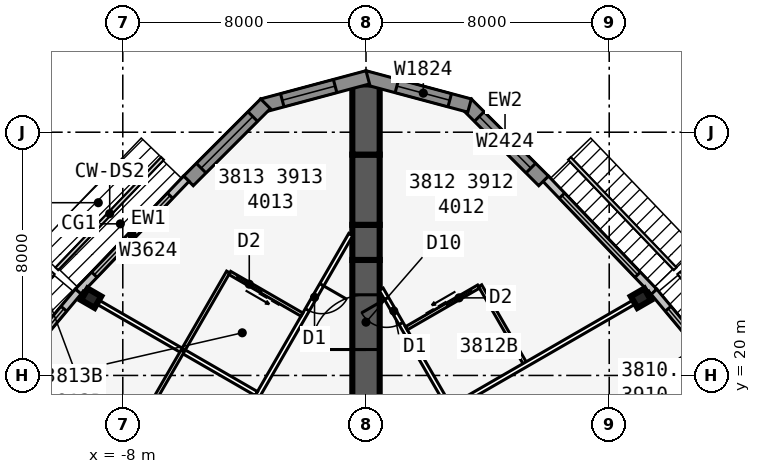
"""IFC4 building model, lengths in metres.
Left out: names, types, materials, properties, quantities, classifications, styles, units other than length and angle.
Written with IfcOpenShell. Run it as: python <this file> out.ifc"""

import sys

from ifc_helpers import new_model, si_unit, direction, frame, frame_2d, origin, origin_2d, place, context, subcontext, project, spatial, polyline, rectangle, i_section, outline, extrude, element, fill, save


model = new_model("IFC4")
c1 = context("Model", 3, precision=1e-05, world=origin(), true_north=direction((0.0, 1.0)))
c2 = subcontext(c1, "Body", "Model", "MODEL_VIEW")
j1 = project(units=[si_unit("LENGTHUNIT", "METRE"), si_unit("PLANEANGLEUNIT", "RADIAN")], contexts=[c1])
p1 = place(None, origin())
s1 = spatial("IfcSite", under=j1, at=p1, CompositionType="ELEMENT")
p2 = place(p1, origin())
s2 = spatial("IfcBuilding", under=s1, at=p2, CompositionType="ELEMENT")
p3 = place(p2, frame((0.0, 0.0, 145.3)))
s3 = spatial("IfcBuildingStorey", under=s2, at=p3, CompositionType="ELEMENT", Elevation=145.3)
p4 = place(p3, frame((0.0, 19.052, 0.0), z_axis=(0.0, 0.0, 1.0), x_axis=(0.0, 1.0, 0.0)))
e1 = element("IfcWall", 1, at=p4, inside=s3, PredefinedType="SHEAR", context=c2, shape_type="SweptSolid", body=[
    extrude(rectangle(XDim=4.746, YDim=0.9, at=frame_2d((2.373, 0.0))), origin(), (0.0, 0.0, 1.0), 3.4),
])
p5 = place(p4, frame((1.8, 0.0, 0.0)))
e2 = element("IfcOpeningElement", 2, at=p5, cuts=e1, PredefinedType="OPENING", context=c2, shape_type="SweptSolid", body=[
    extrude(rectangle(XDim=1.8, YDim=2.13, at=frame_2d((0.9, 1.065))), frame((0.0, 0.46, 0.0), z_axis=(0.0, -1.0, 0.0), x_axis=(1.0, 0.0, 0.0)), (0.0, 0.0, 1.0), 0.92),
])
p6 = place(p3, frame((0.0, 23.799, 0.0), z_axis=(0.0, 0.0, 1.0), x_axis=(0.0, 1.0, 0.0)))
e3 = element("IfcWall", 3, at=p6, inside=s3, PredefinedType="SHEAR", context=c2, shape_type="SweptSolid", body=[
    extrude(rectangle(XDim=1.155, YDim=0.9, at=frame_2d((0.577, 0.0))), origin(), (0.0, 0.0, 1.0), 3.4),
])
p7 = place(p3, frame((0.0, 24.953, 0.0), z_axis=(0.0, 0.0, 1.0), x_axis=(0.0, 1.0, 0.0)))
e4 = element("IfcWall", 4, at=p7, inside=s3, PredefinedType="SHEAR", context=c2, shape_type="SweptSolid", body=[
    extrude(rectangle(XDim=2.309, YDim=0.9, at=frame_2d((1.155, 0.0))), origin(), (0.0, 0.0, 1.0), 3.4),
])
p8 = place(p3, frame((0.0, 27.263, 0.0), z_axis=(0.0, 0.0, 1.0), x_axis=(0.0, 1.0, 0.0)))
e5 = element("IfcWall", 5, at=p8, inside=s3, PredefinedType="SHEAR", context=c2, shape_type="SweptSolid", body=[
    extrude(rectangle(XDim=2.31, YDim=0.9, at=frame_2d((1.155, 0.0))), origin(), (0.0, 0.0, 1.0), 3.4),
])
for number, where, z_axis, x_axis in (
    (6, (9.041, 22.541, 0.0), (0.0, 0.0, 1.0), (-0.5, 0.866, 0.0)),
    (7, (-9.041, 22.541, 0.0), (0.0, 0.0, 1.0), (-0.5, -0.866, 0.0)),
):
    element("IfcColumn", number, at=place(p3, frame(where, z_axis=z_axis, x_axis=x_axis)), inside=s3, PredefinedType="COLUMN", context=c2, shape_type="SweptSolid", body=[
        extrude(i_section(OverallWidth=0.437, OverallDepth=0.513, WebThickness=0.061, FlangeThickness=0.097, at=origin_2d()), origin(), (0.0, 0.0, 1.0), 3.4),
    ])
p9 = place(p3, frame((12.723, 18.868, 0.0), z_axis=(0.0, 0.0, 1.0), x_axis=(-0.641810386606, 0.766863369607, 0.0)))
e8 = element("IfcWall", 8, at=p9, inside=s3, PredefinedType="STANDARD", context=c2, shape_type="SweptSolid", body=[
    extrude(rectangle(XDim=5.076, YDim=0.25, at=frame_2d((2.538, 0.0))), origin(), (0.0, 0.0, 1.0), 3.235),
])
p10 = place(p9, frame((0.738, 0.0, 0.45)))
e9 = element("IfcOpeningElement", 9, at=p10, cuts=e8, PredefinedType="OPENING", context=c2, shape_type="SweptSolid", body=[
    extrude(rectangle(XDim=3.6, YDim=2.4, at=frame_2d((1.8, 1.2))), frame((0.0, 0.135, 0.0), z_axis=(0.0, -1.0, 0.0), x_axis=(1.0, 0.0, 0.0)), (0.0, 0.0, 1.0), 0.27),
])
p11 = place(p3, frame((9.471, 22.754, 0.0), z_axis=(0.0, 0.0, 1.0), x_axis=(-0.691719937936, 0.722165858693, 0.0)))
e10 = element("IfcWall", 10, at=p11, inside=s3, PredefinedType="STANDARD", context=c2, shape_type="SweptSolid", body=[
    extrude(rectangle(XDim=5.148, YDim=0.25, at=frame_2d((2.574, 0.0))), origin(), (0.0, 0.0, 1.0), 3.235),
])
p12 = place(p11, frame((0.774, 0.0, 0.45)))
e11 = element("IfcOpeningElement", 11, at=p12, cuts=e10, PredefinedType="OPENING", context=c2, shape_type="SweptSolid", body=[
    extrude(rectangle(XDim=3.6, YDim=2.4, at=frame_2d((1.8, 1.2))), frame((0.0, 0.135, 0.0), z_axis=(0.0, -1.0, 0.0), x_axis=(1.0, 0.0, 0.0)), (0.0, 0.0, 1.0), 0.27),
])
p13 = place(p3, frame((5.841, 26.399, 0.0), z_axis=(0.0, 0.0, 1.0), x_axis=(-0.707106781187, 0.707106781187, 0.0)))
e12 = element("IfcWall", 12, at=p13, inside=s3, PredefinedType="SOLIDWALL", context=c2, shape_type="SweptSolid", body=[
    extrude(rectangle(XDim=3.586, YDim=0.45, at=frame_2d((1.793, 0.0))), origin(), (0.0, 0.0, 1.0), 3.235),
])
p14 = place(p13, frame((0.593, 0.0, 0.45)))
e13 = element("IfcOpeningElement", 13, at=p14, cuts=e12, PredefinedType="OPENING", context=c2, shape_type="SweptSolid", body=[
    extrude(rectangle(XDim=2.4, YDim=2.4, at=frame_2d((1.2, 1.2))), frame((0.0, 0.235, 0.0), z_axis=(0.0, -1.0, 0.0), x_axis=(1.0, 0.0, 0.0)), (0.0, 0.0, 1.0), 0.47),
])
p15 = place(p3, frame((3.406, 28.877, 0.0), z_axis=(0.0, 0.0, 1.0), x_axis=(-0.965924653531, 0.258823421857, 0.0)))
e14 = element("IfcWall", 14, at=p15, inside=s3, PredefinedType="SOLIDWALL", context=c2, shape_type="SweptSolid", body=[
    extrude(outline(polyline([(3.586, 0.225), (3.527, 0.225), (3.035, 0.093), (3.0, 0.225), (0.0, 0.225), (0.0, -0.225), (3.586, -0.225), (3.586, 0.225)])), origin(), (0.0, 0.0, 1.0), 3.235),
])
p16 = place(p15, frame((0.675, 0.0, 0.45)))
e15 = element("IfcOpeningElement", 15, at=p16, cuts=e14, PredefinedType="OPENING", context=c2, shape_type="SweptSolid", body=[
    extrude(rectangle(XDim=1.8, YDim=2.4, at=frame_2d((0.9, 1.2))), frame((0.0, 0.235, 0.0), z_axis=(0.0, -1.0, 0.0), x_axis=(1.0, 0.0, 0.0)), (0.0, 0.0, 1.0), 0.47),
])
p17 = place(p3, frame((0.058, 29.805, 0.0), z_axis=(0.0, 0.0, 1.0), x_axis=(-0.965924653531, -0.258823421857, 0.0)))
e16 = element("IfcWall", 16, at=p17, inside=s3, PredefinedType="SOLIDWALL", context=c2, shape_type="SweptSolid", body=[
    extrude(outline(polyline([(3.586, 0.225), (0.586, 0.225), (0.551, 0.093), (0.06, 0.225), (0.0, 0.225), (0.0, -0.225), (3.586, -0.225), (3.586, 0.225)])), origin(), (0.0, 0.0, 1.0), 3.235),
])
p18 = place(p17, frame((1.111, 0.0, 0.45)))
e17 = element("IfcOpeningElement", 17, at=p18, cuts=e16, PredefinedType="OPENING", context=c2, shape_type="SweptSolid", body=[
    extrude(rectangle(XDim=1.8, YDim=2.4, at=frame_2d((0.9, 1.2))), frame((0.0, 0.235, 0.0), z_axis=(0.0, -1.0, 0.0), x_axis=(1.0, 0.0, 0.0)), (0.0, 0.0, 1.0), 0.47),
])
p19 = place(p3, frame((-3.305, 28.935, 0.0), z_axis=(0.0, 0.0, 1.0), x_axis=(-0.707106781187, -0.707106781187, 0.0)))
e18 = element("IfcWall", 18, at=p19, inside=s3, PredefinedType="SOLIDWALL", context=c2, shape_type="SweptSolid", body=[
    extrude(rectangle(XDim=3.586, YDim=0.45, at=frame_2d((1.793, 0.0))), origin(), (0.0, 0.0, 1.0), 3.235),
])
p20 = place(p19, frame((0.593, 0.0, 0.45)))
e19 = element("IfcOpeningElement", 19, at=p20, cuts=e18, PredefinedType="OPENING", context=c2, shape_type="SweptSolid", body=[
    extrude(rectangle(XDim=2.4, YDim=2.4, at=frame_2d((1.2, 1.2))), frame((0.0, 0.235, 0.0), z_axis=(0.0, -1.0, 0.0), x_axis=(1.0, 0.0, 0.0)), (0.0, 0.0, 1.0), 0.47),
])
p21 = place(p3, frame((-5.91, 26.472, 0.0), z_axis=(0.0, 0.0, 1.0), x_axis=(-0.691719937936, -0.722165858693, 0.0)))
e20 = element("IfcWall", 20, at=p21, inside=s3, PredefinedType="STANDARD", context=c2, shape_type="SweptSolid", body=[
    extrude(rectangle(XDim=5.148, YDim=0.25, at=frame_2d((2.574, 0.0))), origin(), (0.0, 0.0, 1.0), 3.235),
])
p22 = place(p21, frame((0.774, 0.0, 0.45)))
e21 = element("IfcOpeningElement", 21, at=p22, cuts=e20, PredefinedType="OPENING", context=c2, shape_type="SweptSolid", body=[
    extrude(rectangle(XDim=3.6, YDim=2.4, at=frame_2d((1.8, 1.2))), frame((0.0, 0.135, 0.0), z_axis=(0.0, -1.0, 0.0), x_axis=(1.0, 0.0, 0.0)), (0.0, 0.0, 1.0), 0.27),
])
p23 = place(p3, frame((-9.465, 22.76, 0.0), z_axis=(0.0, 0.0, 1.0), x_axis=(-0.641810386606, -0.766863369607, 0.0)))
e22 = element("IfcWall", 22, at=p23, inside=s3, PredefinedType="STANDARD", context=c2, shape_type="SweptSolid", body=[
    extrude(rectangle(XDim=5.076, YDim=0.25, at=frame_2d((2.538, 0.0))), origin(), (0.0, 0.0, 1.0), 3.235),
])
p24 = place(p23, frame((0.738, 0.0, 0.45)))
e23 = element("IfcOpeningElement", 23, at=p24, cuts=e22, PredefinedType="OPENING", context=c2, shape_type="SweptSolid", body=[
    extrude(rectangle(XDim=3.6, YDim=2.4, at=frame_2d((1.8, 1.2))), frame((0.0, 0.135, 0.0), z_axis=(0.0, -1.0, 0.0), x_axis=(1.0, 0.0, 0.0)), (0.0, 0.0, 1.0), 0.27),
])
p25 = place(p3, frame((20.027, -10.985, 0.0), z_axis=(0.0, 0.0, 1.0), x_axis=(-0.500001677587, 0.866024435227, 0.0)))
e24 = element("IfcWall", 24, at=p25, inside=s3, PredefinedType="PARTITIONING", context=c2, shape_type="SweptSolid", body=[
    extrude(rectangle(XDim=39.054, YDim=0.15, at=frame_2d((19.527, 0.0))), origin(), (0.0, 0.0, 1.0), 3.235),
])
p26 = place(p25, frame((0.352, 0.0, 0.0)))
e25 = element("IfcOpeningElement", 25, at=p26, cuts=e24, PredefinedType="OPENING", context=c2, shape_type="SweptSolid", body=[
    extrude(rectangle(XDim=0.95, YDim=2.13, at=frame_2d((0.475, 1.065))), frame((0.0, 0.085, 0.0), z_axis=(0.0, -1.0, 0.0), x_axis=(1.0, 0.0, 0.0)), (0.0, 0.0, 1.0), 0.17),
])
p27 = place(p25, frame((6.552, 0.0, 0.0)))
e26 = element("IfcOpeningElement", 26, at=p27, cuts=e24, PredefinedType="OPENING", context=c2, shape_type="SweptSolid", body=[
    extrude(rectangle(XDim=0.95, YDim=2.13, at=frame_2d((0.475, 1.065))), frame((0.0, 0.085, 0.0), z_axis=(0.0, -1.0, 0.0), x_axis=(1.0, 0.0, 0.0)), (0.0, 0.0, 1.0), 0.17),
])
p28 = place(p25, frame((17.152, 0.0, 0.0)))
e27 = element("IfcOpeningElement", 27, at=p28, cuts=e24, PredefinedType="OPENING", context=c2, shape_type="SweptSolid", body=[
    extrude(rectangle(XDim=0.95, YDim=2.13, at=frame_2d((0.475, 1.065))), frame((0.0, 0.085, 0.0), z_axis=(0.0, -1.0, 0.0), x_axis=(1.0, 0.0, 0.0)), (0.0, 0.0, 1.0), 0.17),
])
p29 = place(p25, frame((21.552, 0.0, 0.0)))
e28 = element("IfcOpeningElement", 28, at=p29, cuts=e24, PredefinedType="OPENING", context=c2, shape_type="SweptSolid", body=[
    extrude(rectangle(XDim=0.95, YDim=2.13, at=frame_2d((0.475, 1.065))), frame((0.0, 0.085, 0.0), z_axis=(0.0, -1.0, 0.0), x_axis=(1.0, 0.0, 0.0)), (0.0, 0.0, 1.0), 0.17),
])
p30 = place(p25, frame((32.152, 0.0, 0.0)))
e29 = element("IfcOpeningElement", 29, at=p30, cuts=e24, PredefinedType="OPENING", context=c2, shape_type="SweptSolid", body=[
    extrude(rectangle(XDim=0.95, YDim=2.13, at=frame_2d((0.475, 1.065))), frame((0.0, 0.085, 0.0), z_axis=(0.0, -1.0, 0.0), x_axis=(1.0, 0.0, 0.0)), (0.0, 0.0, 1.0), 0.17),
])
p31 = place(p25, frame((37.752, 0.0, 0.0)))
e30 = element("IfcOpeningElement", 30, at=p31, cuts=e24, PredefinedType="OPENING", context=c2, shape_type="SweptSolid", body=[
    extrude(rectangle(XDim=0.95, YDim=2.13, at=frame_2d((0.475, 1.065))), frame((0.0, 0.085, 0.0), z_axis=(0.0, -1.0, 0.0), x_axis=(1.0, 0.0, 0.0)), (0.0, 0.0, 1.0), 0.17),
])
p32 = place(p3, frame((2.829, 18.954, 0.0), z_axis=(0.0, 0.0, 1.0), x_axis=(0.866015739374, 0.500016738876, 0.0)))
e31 = element("IfcWall", 31, at=p32, inside=s3, PredefinedType="PARTITIONING", context=c2, shape_type="SweptSolid", body=[
    extrude(rectangle(XDim=7.516, YDim=0.15, at=frame_2d((3.758, 0.0))), origin(), (0.0, 0.0, 1.0), 2.389),
])
p33 = place(p3, frame((5.253, 20.354, 0.0), z_axis=(0.0, 0.0, 1.0), x_axis=(-0.499990139034, 0.866031096941, 0.0)))
e32 = element("IfcWall", 32, at=p33, inside=s3, PredefinedType="PLUMBINGWALL", context=c2, shape_type="SweptSolid", body=[
    extrude(rectangle(XDim=3.0, YDim=0.12, at=frame_2d((1.5, 0.0))), origin(), (0.0, 0.0, 1.0), 3.235),
])
p34 = place(p3, frame((1.329, 21.552, 0.0), z_axis=(0.0, 0.0, 1.0), x_axis=(0.865997131366, 0.500048966069, 0.0)))
e33 = element("IfcWall", 33, at=p34, inside=s3, PredefinedType="PLUMBINGWALL", context=c2, shape_type="SweptSolid", body=[
    extrude(rectangle(XDim=2.74, YDim=0.12, at=frame_2d((1.37, 0.0))), origin(), (0.0, 0.0, 1.0), 3.235),
])
p35 = place(p34, frame((1.55, 0.0, 0.0)))
e34 = element("IfcOpeningElement", 34, at=p35, cuts=e33, PredefinedType="OPENING", context=c2, shape_type="SweptSolid", body=[
    extrude(rectangle(XDim=0.9, YDim=2.13, at=frame_2d((0.45, 1.065))), frame((0.0, 0.07, 0.0), z_axis=(0.0, -1.0, 0.0), x_axis=(1.0, 0.0, 0.0)), (0.0, 0.0, 1.0), 0.14),
])
p36 = place(p3, frame((-0.5, 24.636, 0.0), z_axis=(0.0, 0.0, 1.0), x_axis=(-0.500001915564, -0.86602429783, 0.0)))
e35 = element("IfcWall", 35, at=p36, inside=s3, PredefinedType="PARTITIONING", context=c2, shape_type="SweptSolid", body=[
    extrude(rectangle(XDim=42.172, YDim=0.15, at=frame_2d((21.086, 0.0))), origin(), (0.0, 0.0, 1.0), 3.235),
])
p37 = place(p36, frame((1.911, 0.0, 0.0)))
e36 = element("IfcOpeningElement", 36, at=p37, cuts=e35, PredefinedType="OPENING", context=c2, shape_type="SweptSolid", body=[
    extrude(rectangle(XDim=0.95, YDim=2.13, at=frame_2d((0.475, 1.065))), frame((0.0, 0.085, 0.0), z_axis=(0.0, -1.0, 0.0), x_axis=(1.0, 0.0, 0.0)), (0.0, 0.0, 1.0), 0.17),
])
p38 = place(p36, frame((9.311, 0.0, 0.0)))
e37 = element("IfcOpeningElement", 37, at=p38, cuts=e35, PredefinedType="OPENING", context=c2, shape_type="SweptSolid", body=[
    extrude(rectangle(XDim=0.95, YDim=2.13, at=frame_2d((0.475, 1.065))), frame((0.0, 0.085, 0.0), z_axis=(0.0, -1.0, 0.0), x_axis=(1.0, 0.0, 0.0)), (0.0, 0.0, 1.0), 0.17),
])
p39 = place(p36, frame((18.111, 0.0, 0.0)))
e38 = element("IfcOpeningElement", 38, at=p39, cuts=e35, PredefinedType="OPENING", context=c2, shape_type="SweptSolid", body=[
    extrude(rectangle(XDim=0.95, YDim=2.13, at=frame_2d((0.475, 1.065))), frame((0.0, 0.085, 0.0), z_axis=(0.0, -1.0, 0.0), x_axis=(1.0, 0.0, 0.0)), (0.0, 0.0, 1.0), 0.17),
])
p40 = place(p36, frame((29.311, 0.0, 0.0)))
e39 = element("IfcOpeningElement", 39, at=p40, cuts=e35, PredefinedType="OPENING", context=c2, shape_type="SweptSolid", body=[
    extrude(rectangle(XDim=0.95, YDim=2.13, at=frame_2d((0.475, 1.065))), frame((0.0, 0.085, 0.0), z_axis=(0.0, -1.0, 0.0), x_axis=(1.0, 0.0, 0.0)), (0.0, 0.0, 1.0), 0.17),
])
p41 = place(p36, frame((39.311, 0.0, 0.0)))
e40 = element("IfcOpeningElement", 40, at=p41, cuts=e35, PredefinedType="OPENING", context=c2, shape_type="SweptSolid", body=[
    extrude(rectangle(XDim=0.95, YDim=2.13, at=frame_2d((0.475, 1.065))), frame((0.0, 0.085, 0.0), z_axis=(0.0, -1.0, 0.0), x_axis=(1.0, 0.0, 0.0)), (0.0, 0.0, 1.0), 0.17),
])
p42 = place(p3, frame((-3.608, 19.404, 0.0), z_axis=(0.0, 0.0, 1.0), x_axis=(-0.866015989873, 0.500016305018, 0.0)))
e41 = element("IfcWall", 41, at=p42, inside=s3, PredefinedType="PARTITIONING", context=c2, shape_type="SweptSolid", body=[
    extrude(rectangle(XDim=6.616, YDim=0.15, at=frame_2d((3.308, 0.0))), origin(), (0.0, 0.0, 1.0), 2.389),
])
p43 = place(p3, frame((-4.533, 23.402, 0.0), z_axis=(0.0, 0.0, 1.0), x_axis=(-0.499990139034, -0.866031096941, 0.0)))
e42 = element("IfcWall", 42, at=p43, inside=s3, PredefinedType="PLUMBINGWALL", context=c2, shape_type="SweptSolid", body=[
    extrude(rectangle(XDim=3.0, YDim=0.12, at=frame_2d((1.5, 0.0))), origin(), (0.0, 0.0, 1.0), 3.235),
])
p44 = place(p3, frame((-2.108, 22.002, 0.0), z_axis=(0.0, 0.0, 1.0), x_axis=(-0.866035715982, 0.499982138324, 0.0)))
e43 = element("IfcWall", 43, at=p44, inside=s3, PredefinedType="PLUMBINGWALL", context=c2, shape_type="SweptSolid", body=[
    extrude(rectangle(XDim=2.74, YDim=0.12, at=frame_2d((1.37, 0.0))), origin(), (0.0, 0.0, 1.0), 3.235),
])
p45 = place(p44, frame((1.55, 0.0, 0.0)))
e44 = element("IfcOpeningElement", 44, at=p45, cuts=e43, PredefinedType="OPENING", context=c2, shape_type="SweptSolid", body=[
    extrude(rectangle(XDim=0.9, YDim=2.13, at=frame_2d((0.45, 1.065))), frame((0.0, 0.07, 0.0), z_axis=(0.0, -1.0, 0.0), x_axis=(1.0, 0.0, 0.0)), (0.0, 0.0, 1.0), 0.14),
])
p46 = place(p3, frame((-6.033, 20.803, 0.0), z_axis=(0.0, 0.0, 1.0), x_axis=(-0.499990139034, -0.866031096941, 0.0)))
e45 = element("IfcWall", 45, at=p46, inside=s3, PredefinedType="PLUMBINGWALL", context=c2, shape_type="SweptSolid", body=[
    extrude(rectangle(XDim=3.0, YDim=0.12, at=frame_2d((1.5, 0.0))), origin(), (0.0, 0.0, 1.0), 3.235),
])
p47 = place(p10, origin())
e46 = element("IfcWindow", 46, at=p47, inside=s3, PartitioningType="SINGLE_PANEL", PredefinedType="WINDOW", context=c2, shape_type="SweptSolid", body=[
    extrude(rectangle(XDim=3.6, YDim=2.4, at=frame_2d((1.8, 1.2))), frame((0.0, 0.03, 0.0), z_axis=(0.0, -1.0, 0.0), x_axis=(1.0, 0.0, 0.0)), (0.0, 0.0, 1.0), 0.06),
])
fill(e9, e46)
p48 = place(p12, origin())
e47 = element("IfcWindow", 47, at=p48, inside=s3, PartitioningType="SINGLE_PANEL", PredefinedType="WINDOW", context=c2, shape_type="SweptSolid", body=[
    extrude(rectangle(XDim=3.6, YDim=2.4, at=frame_2d((1.8, 1.2))), frame((0.0, 0.03, 0.0), z_axis=(0.0, -1.0, 0.0), x_axis=(1.0, 0.0, 0.0)), (0.0, 0.0, 1.0), 0.06),
])
fill(e11, e47)
p49 = place(p14, origin())
e48 = element("IfcWindow", 48, at=p49, inside=s3, PartitioningType="SINGLE_PANEL", PredefinedType="WINDOW", context=c2, shape_type="SweptSolid", body=[
    extrude(rectangle(XDim=2.4, YDim=2.4, at=frame_2d((1.2, 1.2))), frame((0.0, 0.03, 0.0), z_axis=(0.0, -1.0, 0.0), x_axis=(1.0, 0.0, 0.0)), (0.0, 0.0, 1.0), 0.06),
])
fill(e13, e48)
p50 = place(p16, origin())
e49 = element("IfcWindow", 49, at=p50, inside=s3, PartitioningType="SINGLE_PANEL", PredefinedType="WINDOW", context=c2, shape_type="SweptSolid", body=[
    extrude(rectangle(XDim=1.8, YDim=2.4, at=frame_2d((0.9, 1.2))), frame((0.0, 0.03, 0.0), z_axis=(0.0, -1.0, 0.0), x_axis=(1.0, 0.0, 0.0)), (0.0, 0.0, 1.0), 0.06),
])
fill(e15, e49)
p51 = place(p18, origin())
e50 = element("IfcWindow", 50, at=p51, inside=s3, PartitioningType="SINGLE_PANEL", PredefinedType="WINDOW", context=c2, shape_type="SweptSolid", body=[
    extrude(rectangle(XDim=1.8, YDim=2.4, at=frame_2d((0.9, 1.2))), frame((0.0, 0.03, 0.0), z_axis=(0.0, -1.0, 0.0), x_axis=(1.0, 0.0, 0.0)), (0.0, 0.0, 1.0), 0.06),
])
fill(e17, e50)
p52 = place(p20, origin())
e51 = element("IfcWindow", 51, at=p52, inside=s3, PartitioningType="SINGLE_PANEL", PredefinedType="WINDOW", context=c2, shape_type="SweptSolid", body=[
    extrude(rectangle(XDim=2.4, YDim=2.4, at=frame_2d((1.2, 1.2))), frame((0.0, 0.03, 0.0), z_axis=(0.0, -1.0, 0.0), x_axis=(1.0, 0.0, 0.0)), (0.0, 0.0, 1.0), 0.06),
])
fill(e19, e51)
p53 = place(p22, origin())
e52 = element("IfcWindow", 52, at=p53, inside=s3, PartitioningType="SINGLE_PANEL", PredefinedType="WINDOW", context=c2, shape_type="SweptSolid", body=[
    extrude(rectangle(XDim=3.6, YDim=2.4, at=frame_2d((1.8, 1.2))), frame((0.0, 0.03, 0.0), z_axis=(0.0, -1.0, 0.0), x_axis=(1.0, 0.0, 0.0)), (0.0, 0.0, 1.0), 0.06),
])
fill(e21, e52)
p54 = place(p24, origin())
e53 = element("IfcWindow", 53, at=p54, inside=s3, PartitioningType="SINGLE_PANEL", PredefinedType="WINDOW", context=c2, shape_type="SweptSolid", body=[
    extrude(rectangle(XDim=3.6, YDim=2.4, at=frame_2d((1.8, 1.2))), frame((0.0, 0.03, 0.0), z_axis=(0.0, -1.0, 0.0), x_axis=(1.0, 0.0, 0.0)), (0.0, 0.0, 1.0), 0.06),
])
fill(e23, e53)
p55 = place(p35, origin())
e54 = element("IfcDoor", 54, at=p55, inside=s3, OperationType="SLIDING_TO_LEFT", PredefinedType="DOOR", context=c2, shape_type="SweptSolid", body=[
    extrude(rectangle(XDim=0.9, YDim=2.13, at=frame_2d((0.45, 1.065))), frame((0.0, 0.025, 0.0), z_axis=(0.0, -1.0, 0.0), x_axis=(1.0, 0.0, 0.0)), (0.0, 0.0, 1.0), 0.05),
])
fill(e34, e54)
p56 = place(p31, origin())
e55 = element("IfcDoor", 55, at=p56, inside=s3, OperationType="SINGLE_SWING_RIGHT", PredefinedType="DOOR", context=c2, shape_type="SweptSolid", body=[
    extrude(rectangle(XDim=0.95, YDim=2.13, at=frame_2d((0.475, 1.065))), frame((0.0, 0.025, 0.0), z_axis=(0.0, -1.0, 0.0), x_axis=(1.0, 0.0, 0.0)), (0.0, 0.0, 1.0), 0.05),
])
fill(e30, e55)
p57 = place(p45, origin())
e56 = element("IfcDoor", 56, at=p57, inside=s3, OperationType="SLIDING_TO_LEFT", PredefinedType="DOOR", context=c2, shape_type="SweptSolid", body=[
    extrude(rectangle(XDim=0.9, YDim=2.13, at=frame_2d((0.45, 1.065))), frame((0.0, 0.025, 0.0), z_axis=(0.0, -1.0, 0.0), x_axis=(1.0, 0.0, 0.0)), (0.0, 0.0, 1.0), 0.05),
])
fill(e44, e56)
p58 = place(p37, origin())
e57 = element("IfcDoor", 57, at=p58, inside=s3, OperationType="SINGLE_SWING_LEFT", PredefinedType="DOOR", context=c2, shape_type="SweptSolid", body=[
    extrude(rectangle(XDim=0.95, YDim=2.13, at=frame_2d((0.475, 1.065))), frame((0.0, 0.025, 0.0), z_axis=(0.0, -1.0, 0.0), x_axis=(1.0, 0.0, 0.0)), (0.0, 0.0, 1.0), 0.05),
])
fill(e36, e57)
p59 = place(p5, origin())
e58 = element("IfcDoor", 58, at=p59, inside=s3, OperationType="DOUBLE_DOOR_DOUBLE_SWING", PredefinedType="DOOR", context=c2, shape_type="SweptSolid", body=[
    extrude(rectangle(XDim=1.8, YDim=2.13, at=frame_2d((0.9, 1.065))), frame((0.0, 0.025, 0.0), z_axis=(0.0, -1.0, 0.0), x_axis=(1.0, 0.0, 0.0)), (0.0, 0.0, 1.0), 0.05),
])
fill(e2, e58)
save(model, sys.argv[1])
